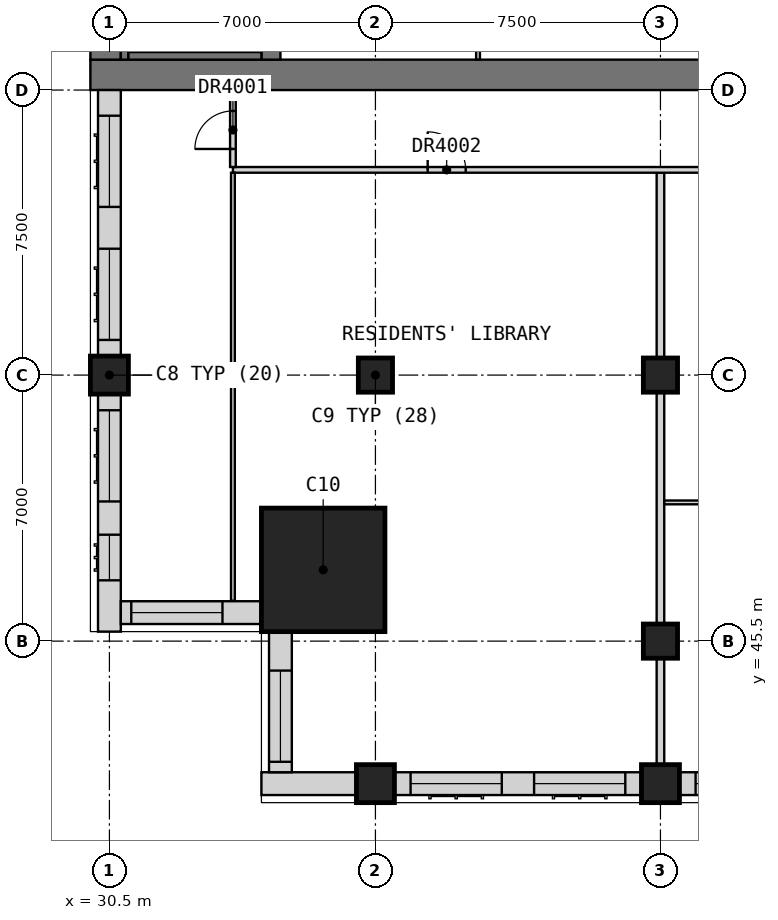
"""IFC4 building model, lengths in metres.
Left out: names, types, materials, properties, quantities, classifications, styles, units other than length and angle.
Written with IfcOpenShell. Run it as: python <this file> out.ifc"""

import sys

from ifc_helpers import new_model, si_unit, direction, frame, frame_2d, origin, origin_2d, place, context, subcontext, project, spatial, rectangle, extrude, element, fill, save


model = new_model("IFC4")
c1 = context("Model", 3, precision=1e-05, world=origin(), true_north=direction((0.0, 1.0)))
c2 = subcontext(c1, "Body", "Model", "MODEL_VIEW")
j1 = project(units=[si_unit("LENGTHUNIT", "METRE"), si_unit("PLANEANGLEUNIT", "RADIAN")], contexts=[c1])
p1 = place(None, origin())
s1 = spatial("IfcSite", under=j1, at=p1, CompositionType="ELEMENT")
p2 = place(p1, origin())
s2 = spatial("IfcBuilding", under=s1, at=p2, CompositionType="ELEMENT")
p3 = place(p2, frame((0.0, 0.0, 189.7)))
s3 = spatial("IfcBuildingStorey", under=s2, at=p3, CompositionType="ELEMENT", Elevation=189.7)
for number, where, z_axis, x_axis in (
    (1, (37.5, 41.75, 0.0), (0.0, 0.0, 1.0), (1.0, 0.0, 0.0)),
    (2, (45.0, 41.75, 0.0), (0.0, 0.0, 1.0), (1.0, 0.0, 0.0)),
    (3, (30.5, 52.5, 0.0), (0.0, 0.0, 1.0), (1.0, 0.0, 0.0)),
):
    element("IfcColumn", number, at=place(p3, frame(where, z_axis=z_axis, x_axis=x_axis)), inside=s3, PredefinedType="COLUMN", context=c2, shape_type="SweptSolid", body=[
        extrude(rectangle(XDim=1.0, YDim=1.0, at=origin_2d()), origin(), (0.0, 0.0, 1.0), 3.5),
    ])
for number, where, z_axis, x_axis in (
    (4, (37.5, 52.5, 0.0), (0.0, 0.0, 1.0), (1.0, 0.0, 0.0)),
    (5, (45.0, 45.5, 0.0), (0.0, 0.0, 1.0), (1.0, 0.0, 0.0)),
    (6, (45.0, 52.5, 0.0), (0.0, 0.0, 1.0), (1.0, 0.0, 0.0)),
):
    element("IfcColumn", number, at=place(p3, frame(where, z_axis=z_axis, x_axis=x_axis)), inside=s3, PredefinedType="COLUMN", context=c2, shape_type="SweptSolid", body=[
        extrude(rectangle(XDim=0.9, YDim=0.9, at=origin_2d()), origin(), (0.0, 0.0, 1.0), 3.5),
    ])
p4 = place(p3, frame((36.125, 47.375, 0.0), z_axis=(0.0, 0.0, 1.0), x_axis=(1.0, 0.0, 0.0)))
e7 = element("IfcColumn", 7, at=p4, inside=s3, PredefinedType="COLUMN", context=c2, shape_type="SweptSolid", body=[
    extrude(rectangle(XDim=3.25, YDim=3.25, at=origin_2d()), origin(), (0.0, 0.0, 1.0), 3.5),
])
p5 = place(p3, frame((30.0, 60.4, 0.0), z_axis=(0.0, 0.0, 1.0), x_axis=(1.0, 0.0, 0.0)))
e8 = element("IfcWall", 8, at=p5, inside=s3, PredefinedType="SHEAR", context=c2, shape_type="SweptSolid", body=[
    extrude(rectangle(XDim=30.0, YDim=0.8, at=frame_2d((15.0, 0.0))), origin(), (0.0, 0.0, 1.0), 3.5),
])
p6 = place(p5, frame((21.9, 0.0, 0.0)))
e9 = element("IfcOpeningElement", 9, at=p6, cuts=e8, PredefinedType="OPENING", context=c2, shape_type="SweptSolid", body=[
    extrude(rectangle(XDim=1.8, YDim=2.1, at=frame_2d((0.9, 1.05))), frame((0.0, 0.41, 0.0), z_axis=(0.0, -1.0, 0.0), x_axis=(1.0, 0.0, 0.0)), (0.0, 0.0, 1.0), 0.82),
])
p7 = place(p5, frame((26.5, 0.0, 0.0)))
e10 = element("IfcOpeningElement", 10, at=p7, cuts=e8, PredefinedType="OPENING", context=c2, shape_type="SweptSolid", body=[
    extrude(rectangle(XDim=1.2, YDim=2.1, at=frame_2d((0.6, 1.05))), frame((0.0, 0.41, 0.0), z_axis=(0.0, -1.0, 0.0), x_axis=(1.0, 0.0, 0.0)), (0.0, 0.0, 1.0), 0.82),
])
p8 = place(p3, frame((30.4, 60.8, 0.0), z_axis=(0.0, 0.0, 1.0), x_axis=(0.0, 1.0, 0.0)))
e11 = element("IfcWall", 11, at=p8, inside=s3, PredefinedType="SHEAR", context=c2, shape_type="SweptSolid", body=[
    extrude(rectangle(XDim=20.9, YDim=0.8, at=frame_2d((10.45, 0.0))), origin(), (0.0, 0.0, 1.0), 3.5),
])
p9 = place(p3, frame((34.75, 60.8, 0.0), z_axis=(0.0, 0.0, 1.0), x_axis=(0.0, 1.0, 0.0)))
e12 = element("IfcWall", 12, at=p9, inside=s3, PredefinedType="SHEAR", context=c2, shape_type="SweptSolid", body=[
    extrude(rectangle(XDim=3.4, YDim=0.5, at=frame_2d((1.7, 0.0))), origin(), (0.0, 0.0, 1.0), 3.5),
])
p10 = place(p3, frame((34.5, 41.75, 0.0), z_axis=(0.0, 0.0, 1.0), x_axis=(1.0, 0.0, 0.0)))
e13 = element("IfcWall", 13, at=p10, inside=s3, PredefinedType="SOLIDWALL", context=c2, shape_type="SweptSolid", body=[
    extrude(rectangle(XDim=2.5, YDim=0.6, at=frame_2d((1.25, 0.0))), origin(), (0.0, 0.0, 1.0), 3.25),
])
p11 = place(p3, frame((38.0, 41.75, 0.0), z_axis=(0.0, 0.0, 1.0), x_axis=(1.0, 0.0, 0.0)))
e14 = element("IfcWall", 14, at=p11, inside=s3, PredefinedType="SOLIDWALL", context=c2, shape_type="SweptSolid", body=[
    extrude(rectangle(XDim=6.5, YDim=0.6, at=frame_2d((3.25, 0.0))), origin(), (0.0, 0.0, 1.0), 2.75),
])
p12 = place(p11, frame((0.425, 0.0, 0.8)))
e15 = element("IfcOpeningElement", 15, at=p12, cuts=e14, PredefinedType="OPENING", context=c2, shape_type="SweptSolid", body=[
    extrude(rectangle(XDim=2.4, YDim=1.8, at=frame_2d((1.2, 0.9))), frame((0.0, 0.31, 0.0), z_axis=(0.0, -1.0, 0.0), x_axis=(1.0, 0.0, 0.0)), (0.0, 0.0, 1.0), 0.62),
])
p13 = place(p11, frame((3.675, 0.0, 0.8)))
e16 = element("IfcOpeningElement", 16, at=p13, cuts=e14, PredefinedType="OPENING", context=c2, shape_type="SweptSolid", body=[
    extrude(rectangle(XDim=2.4, YDim=1.8, at=frame_2d((1.2, 0.9))), frame((0.0, 0.31, 0.0), z_axis=(0.0, -1.0, 0.0), x_axis=(1.0, 0.0, 0.0)), (0.0, 0.0, 1.0), 0.62),
])
p14 = place(p3, frame((45.5, 41.75, 0.0), z_axis=(0.0, 0.0, 1.0), x_axis=(1.0, 0.0, 0.0)))
e17 = element("IfcWall", 17, at=p14, inside=s3, PredefinedType="SOLIDWALL", context=c2, shape_type="SweptSolid", body=[
    extrude(rectangle(XDim=6.5, YDim=0.6, at=frame_2d((3.25, 0.0))), origin(), (0.0, 0.0, 1.0), 2.75),
])
p15 = place(p14, frame((0.425, 0.0, 0.8)))
e18 = element("IfcOpeningElement", 18, at=p15, cuts=e17, PredefinedType="OPENING", context=c2, shape_type="SweptSolid", body=[
    extrude(rectangle(XDim=2.4, YDim=1.8, at=frame_2d((1.2, 0.9))), frame((0.0, 0.31, 0.0), z_axis=(0.0, -1.0, 0.0), x_axis=(1.0, 0.0, 0.0)), (0.0, 0.0, 1.0), 0.62),
])
p16 = place(p14, frame((3.675, 0.0, 0.8)))
e19 = element("IfcOpeningElement", 19, at=p16, cuts=e17, PredefinedType="OPENING", context=c2, shape_type="SweptSolid", body=[
    extrude(rectangle(XDim=2.4, YDim=1.8, at=frame_2d((1.2, 0.9))), frame((0.0, 0.31, 0.0), z_axis=(0.0, -1.0, 0.0), x_axis=(1.0, 0.0, 0.0)), (0.0, 0.0, 1.0), 0.62),
])
p17 = place(p3, frame((30.5, 60.0, 0.0), z_axis=(0.0, 0.0, 1.0), x_axis=(0.0, -1.0, 0.0)))
e20 = element("IfcWall", 20, at=p17, inside=s3, PredefinedType="SOLIDWALL", context=c2, shape_type="SweptSolid", body=[
    extrude(rectangle(XDim=7.0, YDim=0.6, at=frame_2d((3.5, 0.0))), origin(), (0.0, 0.0, 1.0), 3.25),
])
p18 = place(p17, frame((4.175, 0.0, 0.8)))
e21 = element("IfcOpeningElement", 21, at=p18, cuts=e20, PredefinedType="OPENING", context=c2, shape_type="SweptSolid", body=[
    extrude(rectangle(XDim=2.4, YDim=1.8, at=frame_2d((1.2, 0.9))), frame((0.0, 0.31, 0.0), z_axis=(0.0, -1.0, 0.0), x_axis=(1.0, 0.0, 0.0)), (0.0, 0.0, 1.0), 0.62),
])
p19 = place(p17, frame((0.675, 0.0, 0.8)))
e22 = element("IfcOpeningElement", 22, at=p19, cuts=e20, PredefinedType="OPENING", context=c2, shape_type="SweptSolid", body=[
    extrude(rectangle(XDim=2.4, YDim=1.8, at=frame_2d((1.2, 0.9))), frame((0.0, 0.31, 0.0), z_axis=(0.0, -1.0, 0.0), x_axis=(1.0, 0.0, 0.0)), (0.0, 0.0, 1.0), 0.62),
])
p20 = place(p3, frame((30.5, 52.0, 0.0), z_axis=(0.0, 0.0, 1.0), x_axis=(0.0, -1.0, 0.0)))
e23 = element("IfcWall", 23, at=p20, inside=s3, PredefinedType="SOLIDWALL", context=c2, shape_type="SweptSolid", body=[
    extrude(rectangle(XDim=6.25, YDim=0.6, at=frame_2d((3.125, 0.0))), origin(), (0.0, 0.0, 1.0), 2.75),
])
p21 = place(p20, frame((3.7, 0.0, 0.8)))
e24 = element("IfcOpeningElement", 24, at=p21, cuts=e23, PredefinedType="OPENING", context=c2, shape_type="SweptSolid", body=[
    extrude(rectangle(XDim=1.2, YDim=1.8, at=frame_2d((0.6, 0.9))), frame((0.0, 0.31, 0.0), z_axis=(0.0, -1.0, 0.0), x_axis=(1.0, 0.0, 0.0)), (0.0, 0.0, 1.0), 0.62),
])
p22 = place(p20, frame((0.425, 0.0, 0.8)))
e25 = element("IfcOpeningElement", 25, at=p22, cuts=e23, PredefinedType="OPENING", context=c2, shape_type="SweptSolid", body=[
    extrude(rectangle(XDim=2.4, YDim=1.8, at=frame_2d((1.2, 0.9))), frame((0.0, 0.31, 0.0), z_axis=(0.0, -1.0, 0.0), x_axis=(1.0, 0.0, 0.0)), (0.0, 0.0, 1.0), 0.62),
])
p23 = place(p3, frame((30.8, 46.25, 0.0), z_axis=(0.0, 0.0, 1.0), x_axis=(1.0, 0.0, 0.0)))
e26 = element("IfcWall", 26, at=p23, inside=s3, PredefinedType="SOLIDWALL", context=c2, shape_type="SweptSolid", body=[
    extrude(rectangle(XDim=3.7, YDim=0.6, at=frame_2d((1.85, 0.0))), origin(), (0.0, 0.0, 1.0), 3.25),
])
p24 = place(p23, frame((0.275, 0.0, 0.8)))
e27 = element("IfcOpeningElement", 27, at=p24, cuts=e26, PredefinedType="OPENING", context=c2, shape_type="SweptSolid", body=[
    extrude(rectangle(XDim=2.4, YDim=1.8, at=frame_2d((1.2, 0.9))), frame((0.0, 0.31, 0.0), z_axis=(0.0, -1.0, 0.0), x_axis=(1.0, 0.0, 0.0)), (0.0, 0.0, 1.0), 0.62),
])
p25 = place(p3, frame((35.0, 45.75, 0.0), z_axis=(0.0, 0.0, 1.0), x_axis=(0.0, -1.0, 0.0)))
e28 = element("IfcWall", 28, at=p25, inside=s3, PredefinedType="SOLIDWALL", context=c2, shape_type="SweptSolid", body=[
    extrude(rectangle(XDim=3.7, YDim=0.6, at=frame_2d((1.85, 0.0))), origin(), (0.0, 0.0, 1.0), 3.25),
])
p26 = place(p25, frame((1.025, 0.0, 0.8)))
e29 = element("IfcOpeningElement", 29, at=p26, cuts=e28, PredefinedType="OPENING", context=c2, shape_type="SweptSolid", body=[
    extrude(rectangle(XDim=2.4, YDim=1.8, at=frame_2d((1.2, 0.9))), frame((0.0, 0.31, 0.0), z_axis=(0.0, -1.0, 0.0), x_axis=(1.0, 0.0, 0.0)), (0.0, 0.0, 1.0), 0.62),
])
p27 = place(p3, frame((40.2, 60.8, 0.0), z_axis=(0.0, 0.0, 1.0), x_axis=(0.0, 1.0, 0.0)))
e30 = element("IfcWall", 30, at=p27, inside=s3, PredefinedType="PARTITIONING", context=c2, shape_type="SweptSolid", body=[
    extrude(rectangle(XDim=3.2, YDim=0.1, at=frame_2d((1.6, 0.0))), origin(), (0.0, 0.0, 1.0), 3.25),
])
p28 = place(p3, frame((30.9, 60.8, 0.0), z_axis=(0.0, 0.0, 1.0), x_axis=(0.0, 1.0, 0.0)))
e31 = element("IfcWall", 31, at=p28, inside=s3, PredefinedType="SOLIDWALL", context=c2, shape_type="SweptSolid", body=[
    extrude(rectangle(XDim=20.9, YDim=0.2, at=frame_2d((10.45, 0.0))), origin(), (0.0, 0.0, 1.0), 3.25),
])
p29 = place(p3, frame((31.0, 60.9, 0.0), z_axis=(0.0, 0.0, 1.0), x_axis=(1.0, 0.0, 0.0)))
e32 = element("IfcWall", 32, at=p29, inside=s3, PredefinedType="SOLIDWALL", context=c2, shape_type="SweptSolid", body=[
    extrude(rectangle(XDim=3.5, YDim=0.2, at=frame_2d((1.75, 0.0))), origin(), (0.0, 0.0, 1.0), 3.25),
])
p30 = place(p3, frame((45.0, 41.25, 0.0), z_axis=(0.0, 0.0, 1.0), x_axis=(0.0, 1.0, 0.0)))
e33 = element("IfcWall", 33, at=p30, inside=s3, PredefinedType="PARTITIONING", context=c2, shape_type="SweptSolid", body=[
    extrude(rectangle(XDim=16.575, YDim=0.2, at=frame_2d((8.288, 0.0))), origin(), (0.0, 0.0, 1.0), 3.25),
])
p31 = place(p3, frame((33.75, 57.9, 0.0), z_axis=(0.0, 0.0, 1.0), x_axis=(1.0, 0.0, 0.0)))
e34 = element("IfcWall", 34, at=p31, inside=s3, PredefinedType="PARTITIONING", context=c2, shape_type="SweptSolid", body=[
    extrude(rectangle(XDim=28.35, YDim=0.15, at=frame_2d((14.175, 0.0))), origin(), (0.0, 0.0, 1.0), 3.25),
])
p32 = place(p31, frame((5.125, 0.0, 0.0)))
e35 = element("IfcOpeningElement", 35, at=p32, cuts=e34, PredefinedType="OPENING", context=c2, shape_type="SweptSolid", body=[
    extrude(rectangle(XDim=1.0, YDim=2.1, at=frame_2d((0.5, 1.05))), frame((0.0, 0.085, 0.0), z_axis=(0.0, -1.0, 0.0), x_axis=(1.0, 0.0, 0.0)), (0.0, 0.0, 1.0), 0.17),
])
p33 = place(p31, frame((12.675, 0.0, 0.0)))
e36 = element("IfcOpeningElement", 36, at=p33, cuts=e34, PredefinedType="OPENING", context=c2, shape_type="SweptSolid", body=[
    extrude(rectangle(XDim=0.9, YDim=2.1, at=frame_2d((0.45, 1.05))), frame((0.0, 0.085, 0.0), z_axis=(0.0, -1.0, 0.0), x_axis=(1.0, 0.0, 0.0)), (0.0, 0.0, 1.0), 0.17),
])
p34 = place(p31, frame((20.175, 0.0, 0.0)))
e37 = element("IfcOpeningElement", 37, at=p34, cuts=e34, PredefinedType="OPENING", context=c2, shape_type="SweptSolid", body=[
    extrude(rectangle(XDim=0.9, YDim=2.1, at=frame_2d((0.45, 1.05))), frame((0.0, 0.085, 0.0), z_axis=(0.0, -1.0, 0.0), x_axis=(1.0, 0.0, 0.0)), (0.0, 0.0, 1.0), 0.17),
])
p35 = place(p31, frame((26.8, 0.0, 0.0)))
e38 = element("IfcOpeningElement", 38, at=p35, cuts=e34, PredefinedType="OPENING", context=c2, shape_type="SweptSolid", body=[
    extrude(rectangle(XDim=1.0, YDim=2.1, at=frame_2d((0.5, 1.05))), frame((0.0, 0.085, 0.0), z_axis=(0.0, -1.0, 0.0), x_axis=(1.0, 0.0, 0.0)), (0.0, 0.0, 1.0), 0.17),
])
p36 = place(p3, frame((33.75, 57.975, 0.0), z_axis=(0.0, 0.0, 1.0), x_axis=(0.0, 1.0, 0.0)))
e39 = element("IfcWall", 39, at=p36, inside=s3, PredefinedType="PARTITIONING", context=c2, shape_type="SweptSolid", body=[
    extrude(rectangle(XDim=2.025, YDim=0.15, at=frame_2d((1.012, 0.0))), origin(), (0.0, 0.0, 1.0), 3.25),
])
p37 = place(p36, frame((0.475, 0.0, 0.0)))
e40 = element("IfcOpeningElement", 40, at=p37, cuts=e39, PredefinedType="OPENING", context=c2, shape_type="SweptSolid", body=[
    extrude(rectangle(XDim=1.0, YDim=2.1, at=frame_2d((0.5, 1.05))), frame((0.0, 0.085, 0.0), z_axis=(0.0, -1.0, 0.0), x_axis=(1.0, 0.0, 0.0)), (0.0, 0.0, 1.0), 0.17),
])
p38 = place(p3, frame((45.1, 49.15, 0.0), z_axis=(0.0, 0.0, 1.0), x_axis=(1.0, 0.0, 0.0)))
e41 = element("IfcWall", 41, at=p38, inside=s3, PredefinedType="PARTITIONING", context=c2, shape_type="SweptSolid", body=[
    extrude(rectangle(XDim=14.8, YDim=0.1, at=frame_2d((7.4, 0.0))), origin(), (0.0, 0.0, 1.0), 3.25),
])
p39 = place(p38, frame((1.325, 0.0, 0.0)))
e42 = element("IfcOpeningElement", 42, at=p39, cuts=e41, PredefinedType="OPENING", context=c2, shape_type="SweptSolid", body=[
    extrude(rectangle(XDim=0.9, YDim=2.1, at=frame_2d((0.45, 1.05))), frame((0.0, 0.06, 0.0), z_axis=(0.0, -1.0, 0.0), x_axis=(1.0, 0.0, 0.0)), (0.0, 0.0, 1.0), 0.12),
])
p40 = place(p38, frame((8.825, 0.0, 0.0)))
e43 = element("IfcOpeningElement", 43, at=p40, cuts=e41, PredefinedType="OPENING", context=c2, shape_type="SweptSolid", body=[
    extrude(rectangle(XDim=0.9, YDim=2.1, at=frame_2d((0.45, 1.05))), frame((0.0, 0.06, 0.0), z_axis=(0.0, -1.0, 0.0), x_axis=(1.0, 0.0, 0.0)), (0.0, 0.0, 1.0), 0.12),
])
p41 = place(p3, frame((33.75, 46.56, 0.0), z_axis=(0.0, 0.0, 1.0), x_axis=(0.0, 1.0, 0.0)))
e44 = element("IfcWall", 44, at=p41, inside=s3, PredefinedType="PARTITIONING", context=c2, shape_type="SweptSolid", body=[
    extrude(rectangle(XDim=11.265, YDim=0.1, at=frame_2d((5.632, 0.0))), origin(), (0.0, 0.0, 1.0), 3.25),
])
p42 = place(p12, origin())
e45 = element("IfcWindow", 45, at=p42, inside=s3, PartitioningType="SINGLE_PANEL", PredefinedType="WINDOW", context=c2, shape_type="SweptSolid", body=[
    extrude(rectangle(XDim=2.4, YDim=1.8, at=frame_2d((1.2, 0.9))), frame((0.0, -0.07, 0.0), z_axis=(0.0, -1.0, 0.0), x_axis=(1.0, 0.0, 0.0)), (0.0, 0.0, 1.0), 0.06),
])
fill(e15, e45)
p43 = place(p13, origin())
e46 = element("IfcWindow", 46, at=p43, inside=s3, PartitioningType="SINGLE_PANEL", PredefinedType="WINDOW", context=c2, shape_type="SweptSolid", body=[
    extrude(rectangle(XDim=2.4, YDim=1.8, at=frame_2d((1.2, 0.9))), frame((0.0, -0.07, 0.0), z_axis=(0.0, -1.0, 0.0), x_axis=(1.0, 0.0, 0.0)), (0.0, 0.0, 1.0), 0.06),
])
fill(e16, e46)
p44 = place(p15, origin())
e47 = element("IfcWindow", 47, at=p44, inside=s3, PartitioningType="SINGLE_PANEL", PredefinedType="WINDOW", context=c2, shape_type="SweptSolid", body=[
    extrude(rectangle(XDim=2.4, YDim=1.8, at=frame_2d((1.2, 0.9))), frame((0.0, -0.07, 0.0), z_axis=(0.0, -1.0, 0.0), x_axis=(1.0, 0.0, 0.0)), (0.0, 0.0, 1.0), 0.06),
])
fill(e18, e47)
p45 = place(p18, origin())
e48 = element("IfcWindow", 48, at=p45, inside=s3, PartitioningType="SINGLE_PANEL", PredefinedType="WINDOW", context=c2, shape_type="SweptSolid", body=[
    extrude(rectangle(XDim=2.4, YDim=1.8, at=frame_2d((1.2, 0.9))), frame((0.0, -0.07, 0.0), z_axis=(0.0, -1.0, 0.0), x_axis=(1.0, 0.0, 0.0)), (0.0, 0.0, 1.0), 0.06),
])
fill(e21, e48)
p46 = place(p19, origin())
e49 = element("IfcWindow", 49, at=p46, inside=s3, PartitioningType="SINGLE_PANEL", PredefinedType="WINDOW", context=c2, shape_type="SweptSolid", body=[
    extrude(rectangle(XDim=2.4, YDim=1.8, at=frame_2d((1.2, 0.9))), frame((0.0, -0.07, 0.0), z_axis=(0.0, -1.0, 0.0), x_axis=(1.0, 0.0, 0.0)), (0.0, 0.0, 1.0), 0.06),
])
fill(e22, e49)
p47 = place(p21, origin())
e50 = element("IfcWindow", 50, at=p47, inside=s3, PartitioningType="SINGLE_PANEL", PredefinedType="WINDOW", context=c2, shape_type="SweptSolid", body=[
    extrude(rectangle(XDim=1.2, YDim=1.8, at=frame_2d((0.6, 0.9))), frame((0.0, -0.07, 0.0), z_axis=(0.0, -1.0, 0.0), x_axis=(1.0, 0.0, 0.0)), (0.0, 0.0, 1.0), 0.06),
])
fill(e24, e50)
p48 = place(p22, origin())
e51 = element("IfcWindow", 51, at=p48, inside=s3, PartitioningType="SINGLE_PANEL", PredefinedType="WINDOW", context=c2, shape_type="SweptSolid", body=[
    extrude(rectangle(XDim=2.4, YDim=1.8, at=frame_2d((1.2, 0.9))), frame((0.0, -0.07, 0.0), z_axis=(0.0, -1.0, 0.0), x_axis=(1.0, 0.0, 0.0)), (0.0, 0.0, 1.0), 0.06),
])
fill(e25, e51)
p49 = place(p24, origin())
e52 = element("IfcWindow", 52, at=p49, inside=s3, PartitioningType="SINGLE_PANEL", PredefinedType="WINDOW", context=c2, shape_type="SweptSolid", body=[
    extrude(rectangle(XDim=2.4, YDim=1.8, at=frame_2d((1.2, 0.9))), frame((0.0, -0.07, 0.0), z_axis=(0.0, -1.0, 0.0), x_axis=(1.0, 0.0, 0.0)), (0.0, 0.0, 1.0), 0.06),
])
fill(e27, e52)
p50 = place(p26, origin())
e53 = element("IfcWindow", 53, at=p50, inside=s3, PartitioningType="SINGLE_PANEL", PredefinedType="WINDOW", context=c2, shape_type="SweptSolid", body=[
    extrude(rectangle(XDim=2.4, YDim=1.8, at=frame_2d((1.2, 0.9))), frame((0.0, -0.07, 0.0), z_axis=(0.0, -1.0, 0.0), x_axis=(1.0, 0.0, 0.0)), (0.0, 0.0, 1.0), 0.06),
])
fill(e29, e53)
p51 = place(p37, origin())
e54 = element("IfcDoor", 54, at=p51, inside=s3, OperationType="SINGLE_SWING_LEFT", PredefinedType="DOOR", context=c2, shape_type="SweptSolid", body=[
    extrude(rectangle(XDim=1.0, YDim=2.1, at=frame_2d((0.5, 1.05))), frame((0.0, 0.025, 0.0), z_axis=(0.0, -1.0, 0.0), x_axis=(1.0, 0.0, 0.0)), (0.0, 0.0, 1.0), 0.05),
])
fill(e40, e54)
p52 = place(p32, origin())
e55 = element("IfcDoor", 55, at=p52, inside=s3, OperationType="SINGLE_SWING_RIGHT", PredefinedType="DOOR", context=c2, shape_type="SweptSolid", body=[
    extrude(rectangle(XDim=1.0, YDim=2.1, at=frame_2d((0.5, 1.05))), frame((0.0, 0.025, 0.0), z_axis=(0.0, -1.0, 0.0), x_axis=(1.0, 0.0, 0.0)), (0.0, 0.0, 1.0), 0.05),
])
fill(e35, e55)
save(model, sys.argv[1])
